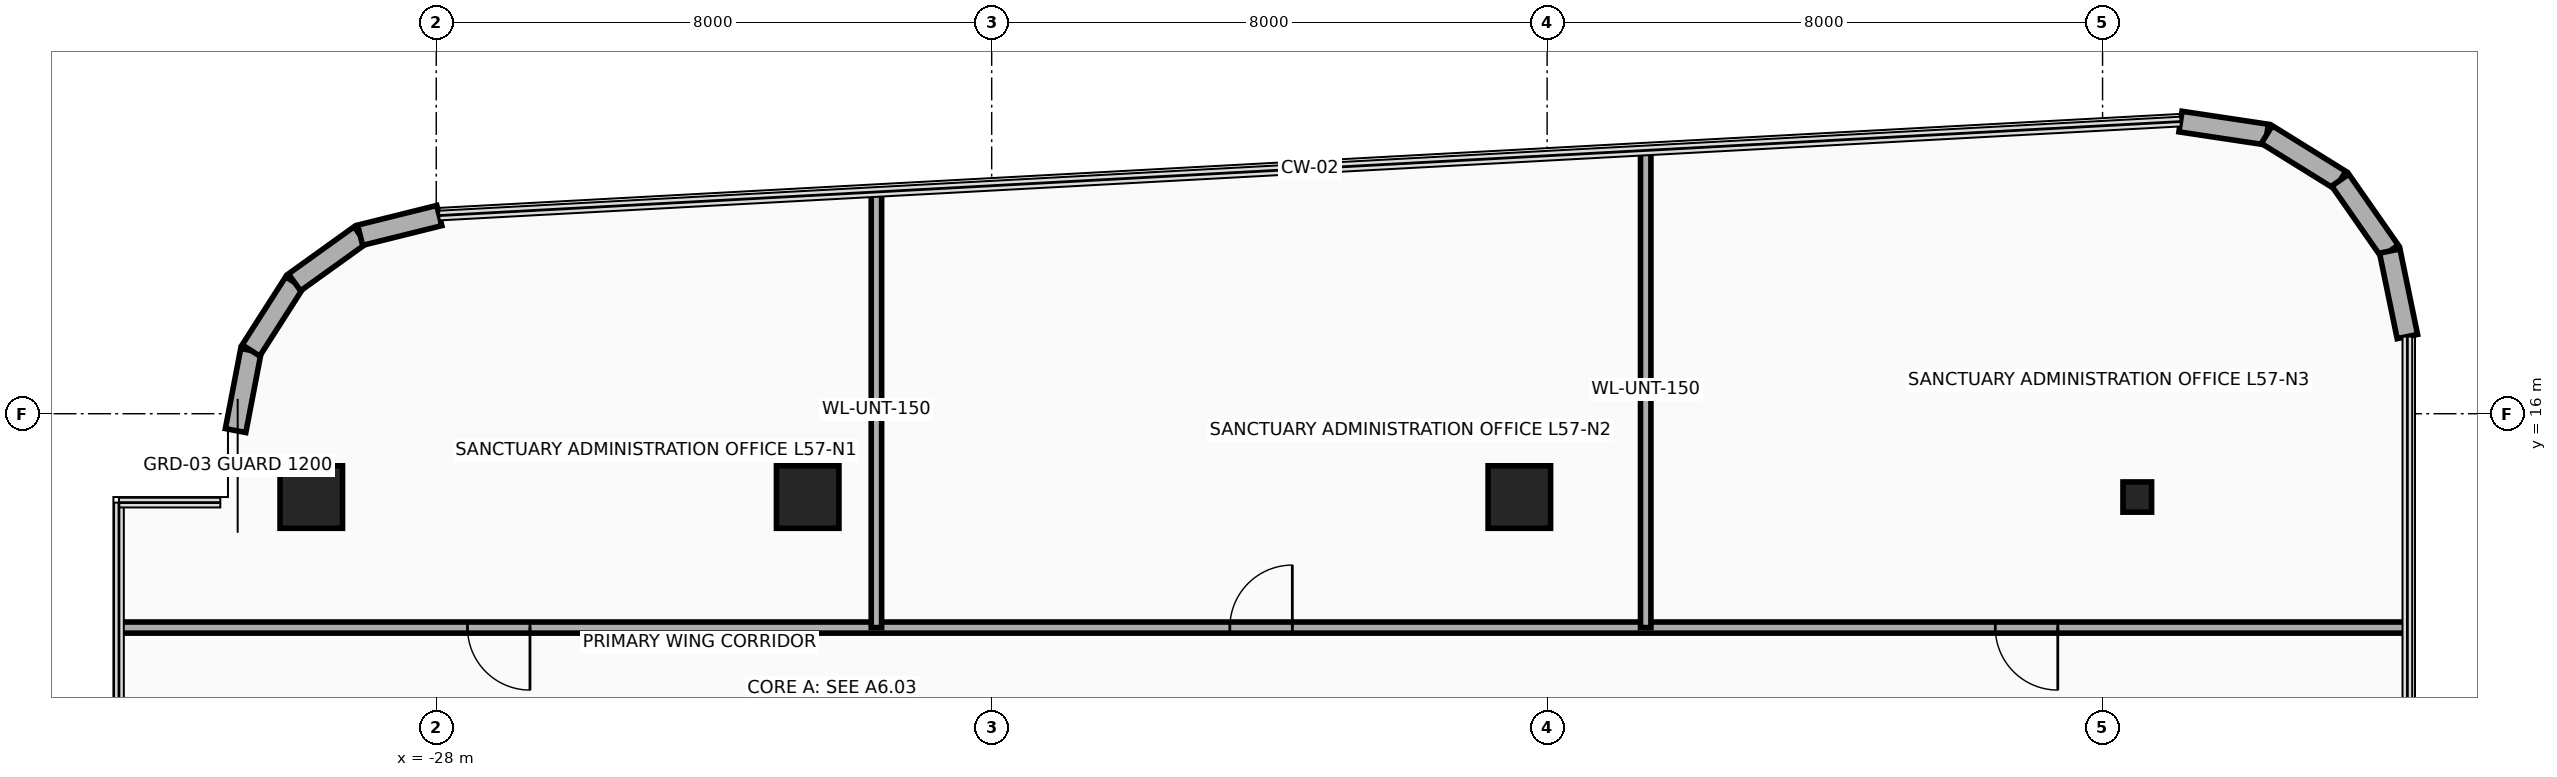
"""IFC4 building model, lengths in metres.
Left out: names, types, materials, properties, quantities, classifications, styles, units other than length and angle.
Written with IfcOpenShell. Run it as: python <this file> out.ifc"""

import sys

from ifc_helpers import new_model, si_unit, direction, frame, frame_2d, origin, origin_2d, place, context, subcontext, project, spatial, rectangle, i_section, extrude, source, transform, mapped, element, fill, save


model = new_model("IFC4")
c1 = context("Model", 3, precision=1e-05, world=origin(), true_north=direction((0.0, 1.0)))
c2 = subcontext(c1, "Body", "Model", "MODEL_VIEW")
j1 = project(units=[si_unit("LENGTHUNIT", "METRE"), si_unit("PLANEANGLEUNIT", "RADIAN")], contexts=[c1])
p1 = place(None, origin())
s1 = spatial("IfcSite", under=j1, at=p1, CompositionType="ELEMENT")
p2 = place(p1, origin())
s2 = spatial("IfcBuilding", under=s1, at=p2, CompositionType="ELEMENT")
p3 = place(p2, frame((0.0, 0.0, 223.0)))
s3 = spatial("IfcBuildingStorey", under=s2, at=p3, CompositionType="ELEMENT", Elevation=223.0)
m1 = source(origin(), c2, "Body", "SweptSolid", [
    extrude(rectangle(XDim=0.9, YDim=0.9, at=origin_2d()), origin(), (0.0, 0.0, 1.0), 3.5),
])
for number, where, z_axis, x_axis in (
    (1, (-29.8, 14.8, 0.0), (0.0, 0.0, 1.0), (1.0, 0.0, 0.0)),
    (2, (-22.65, 14.8, 0.0), (0.0, 0.0, 1.0), (1.0, 0.0, 0.0)),
    (3, (-12.4, 14.8, 0.0), (0.0, 0.0, 1.0), (1.0, 0.0, 0.0)),
):
    element("IfcColumn", number, at=place(p3, frame(where, z_axis=z_axis, x_axis=x_axis)), inside=s3, PredefinedType="COLUMN", context=c2, shape_type="MappedRepresentation", body=[
        mapped(m1, transform((0.0, 0.0, 0.0), x_axis=(1.0, 0.0, 0.0), y_axis=(0.0, 1.0, 0.0), z_axis=(0.0, 0.0, 1.0), scale=1.0)),
    ])
m2 = source(origin(), c2, "Body", "SweptSolid", [
    extrude(i_section(OverallWidth=0.412, OverallDepth=0.435, WebThickness=0.036, FlangeThickness=0.057, at=origin_2d()), origin(), (0.0, 0.0, 1.0), 3.5),
])
p4 = place(p3, frame((-3.5, 14.8, 0.0), z_axis=(0.0, 0.0, 1.0), x_axis=(1.0, 0.0, 0.0)))
e4 = element("IfcColumn", 4, at=p4, inside=s3, PredefinedType="COLUMN", context=c2, shape_type="MappedRepresentation", body=[
    mapped(m2, transform((0.0, 0.0, 0.0), x_axis=(1.0, 0.0, 0.0), y_axis=(0.0, 1.0, 0.0), z_axis=(0.0, 0.0, 1.0), scale=1.0)),
])
p5 = place(p3, frame((-30.89, 15.758, 0.0), z_axis=(0.0, 0.0, 1.0), x_axis=(0.18831542659, 0.982108598938, 0.0)))
e5 = element("IfcWall", 5, at=p5, inside=s3, PredefinedType="SOLIDWALL", context=c2, shape_type="SweptSolid", body=[
    extrude(rectangle(XDim=1.175, YDim=0.3, at=frame_2d((0.587, 0.0))), origin(), (0.0, 0.0, 1.0), 3.26),
])
p6 = place(p3, frame((-30.669, 16.911, 0.0), z_axis=(0.0, 0.0, 1.0), x_axis=(0.538678781902, 0.84251122837, 0.0)))
e6 = element("IfcWall", 6, at=p6, inside=s3, PredefinedType="SOLIDWALL", context=c2, shape_type="SweptSolid", body=[
    extrude(rectangle(XDim=1.164, YDim=0.3, at=frame_2d((0.582, 0.0))), origin(), (0.0, 0.0, 1.0), 3.26),
])
p7 = place(p3, frame((-30.042, 17.892, 0.0), z_axis=(0.0, 0.0, 1.0), x_axis=(0.812313539683, 0.583220981487, 0.0)))
e7 = element("IfcWall", 7, at=p7, inside=s3, PredefinedType="SOLIDWALL", context=c2, shape_type="SweptSolid", body=[
    extrude(rectangle(XDim=1.164, YDim=0.3, at=frame_2d((0.582, 0.0))), origin(), (0.0, 0.0, 1.0), 3.26),
])
p8 = place(p3, frame((-29.096, 18.571, 0.0), z_axis=(0.0, 0.0, 1.0), x_axis=(0.97050812798, 0.241068400098, 0.0)))
e8 = element("IfcWall", 8, at=p8, inside=s3, PredefinedType="SOLIDWALL", context=c2, shape_type="SweptSolid", body=[
    extrude(rectangle(XDim=1.175, YDim=0.3, at=frame_2d((0.587, 0.0))), origin(), (0.0, 0.0, 1.0), 3.26),
])
p9 = place(p3, frame((-2.878, 20.208, 0.0), z_axis=(0.0, 0.0, 1.0), x_axis=(0.988902138571, -0.148568369208, 0.0)))
e9 = element("IfcWall", 9, at=p9, inside=s3, PredefinedType="SOLIDWALL", context=c2, shape_type="SweptSolid", body=[
    extrude(rectangle(XDim=1.257, YDim=0.3, at=frame_2d((0.628, 0.0))), origin(), (0.0, 0.0, 1.0), 3.26),
])
p10 = place(p3, frame((-1.635, 20.021, 0.0), z_axis=(0.0, 0.0, 1.0), x_axis=(0.849646224094, -0.52735310171, 0.0)))
e10 = element("IfcWall", 10, at=p10, inside=s3, PredefinedType="SOLIDWALL", context=c2, shape_type="SweptSolid", body=[
    extrude(rectangle(XDim=1.245, YDim=0.3, at=frame_2d((0.623, 0.0))), origin(), (0.0, 0.0, 1.0), 3.26),
])
p11 = place(p3, frame((-0.576, 19.364, 0.0), z_axis=(0.0, 0.0, 1.0), x_axis=(0.572304219931, -0.820041389107, 0.0)))
e11 = element("IfcWall", 11, at=p11, inside=s3, PredefinedType="SOLIDWALL", context=c2, shape_type="SweptSolid", body=[
    extrude(rectangle(XDim=1.246, YDim=0.3, at=frame_2d((0.623, 0.0))), origin(), (0.0, 0.0, 1.0), 3.26),
])
p12 = place(p3, frame((0.136, 18.343, 0.0), z_axis=(0.0, 0.0, 1.0), x_axis=(0.201603599025, -0.979467196419, 0.0)))
e12 = element("IfcWall", 12, at=p12, inside=s3, PredefinedType="SOLIDWALL", context=c2, shape_type="SweptSolid", body=[
    extrude(rectangle(XDim=1.257, YDim=0.3, at=frame_2d((0.628, 0.0))), origin(), (0.0, 0.0, 1.0), 3.26),
])
p13 = place(p3, frame((-32.54, 12.92, 0.0), z_axis=(0.0, 0.0, 1.0), x_axis=(1.0, 0.0, 0.0)))
e13 = element("IfcWall", 13, at=p13, inside=s3, PredefinedType="PARTITIONING", context=c2, shape_type="SweptSolid", body=[
    extrude(rectangle(XDim=32.93, YDim=0.16, at=frame_2d((16.465, 0.0))), origin(), (0.0, 0.0, 1.0), 2.634),
])
p14 = place(p13, frame((4.99, 0.0, 0.0)))
e14 = element("IfcOpeningElement", 14, at=p14, cuts=e13, PredefinedType="OPENING", context=c2, shape_type="SweptSolid", body=[
    extrude(rectangle(XDim=0.9, YDim=2.1, at=frame_2d((0.45, 1.05))), frame((0.0, 0.095, 0.0), z_axis=(0.0, -1.0, 0.0), x_axis=(1.0, 0.0, 0.0)), (0.0, 0.0, 1.0), 0.19),
])
p15 = place(p13, frame((15.97, 0.0, 0.0)))
e15 = element("IfcOpeningElement", 15, at=p15, cuts=e13, PredefinedType="OPENING", context=c2, shape_type="SweptSolid", body=[
    extrude(rectangle(XDim=0.9, YDim=2.1, at=frame_2d((0.45, 1.05))), frame((0.0, 0.095, 0.0), z_axis=(0.0, -1.0, 0.0), x_axis=(1.0, 0.0, 0.0)), (0.0, 0.0, 1.0), 0.19),
])
p16 = place(p13, frame((26.995, 0.0, 0.0)))
e16 = element("IfcOpeningElement", 16, at=p16, cuts=e13, PredefinedType="OPENING", context=c2, shape_type="SweptSolid", body=[
    extrude(rectangle(XDim=0.9, YDim=2.1, at=frame_2d((0.45, 1.05))), frame((0.0, 0.095, 0.0), z_axis=(0.0, -1.0, 0.0), x_axis=(1.0, 0.0, 0.0)), (0.0, 0.0, 1.0), 0.19),
])
p17 = place(p3, frame((-21.66, 12.92, 0.0), z_axis=(0.0, 0.0, 1.0), x_axis=(0.0, 1.0, 0.0)))
e17 = element("IfcWall", 17, at=p17, inside=s3, PredefinedType="PARTITIONING", context=c2, shape_type="SweptSolid", body=[
    extrude(rectangle(XDim=6.274, YDim=0.15, at=frame_2d((3.137, 0.0))), origin(), (0.0, 0.0, 1.0), 2.544),
])
p18 = place(p3, frame((-10.58, 12.92, 0.0), z_axis=(0.0, 0.0, 1.0), x_axis=(0.0, 1.0, 0.0)))
e18 = element("IfcWall", 18, at=p18, inside=s3, PredefinedType="PARTITIONING", context=c2, shape_type="SweptSolid", body=[
    extrude(rectangle(XDim=6.872, YDim=0.15, at=frame_2d((3.436, 0.0))), origin(), (0.0, 0.0, 1.0), 2.544),
])
p19 = place(p14, frame((0.9, 0.0, 0.0), z_axis=(0.0, 0.0, 1.0), x_axis=(-1.0, 0.0, 0.0)))
e19 = element("IfcDoor", 19, at=p19, inside=s3, OperationType="SINGLE_SWING_LEFT", PredefinedType="DOOR", context=c2, shape_type="SweptSolid", body=[
    extrude(rectangle(XDim=0.9, YDim=2.1, at=frame_2d((0.45, 1.05))), frame((0.0, 0.025, 0.0), z_axis=(0.0, -1.0, 0.0), x_axis=(1.0, 0.0, 0.0)), (0.0, 0.0, 1.0), 0.05),
])
fill(e14, e19)
p20 = place(p15, origin())
e20 = element("IfcDoor", 20, at=p20, inside=s3, OperationType="SINGLE_SWING_RIGHT", PredefinedType="DOOR", context=c2, shape_type="SweptSolid", body=[
    extrude(rectangle(XDim=0.9, YDim=2.1, at=frame_2d((0.45, 1.05))), frame((0.0, 0.025, 0.0), z_axis=(0.0, -1.0, 0.0), x_axis=(1.0, 0.0, 0.0)), (0.0, 0.0, 1.0), 0.05),
])
fill(e15, e20)
p21 = place(p16, frame((0.9, 0.0, 0.0), z_axis=(0.0, 0.0, 1.0), x_axis=(-1.0, 0.0, 0.0)))
e21 = element("IfcDoor", 21, at=p21, inside=s3, OperationType="SINGLE_SWING_LEFT", PredefinedType="DOOR", context=c2, shape_type="SweptSolid", body=[
    extrude(rectangle(XDim=0.9, YDim=2.1, at=frame_2d((0.45, 1.05))), frame((0.0, 0.025, 0.0), z_axis=(0.0, -1.0, 0.0), x_axis=(1.0, 0.0, 0.0)), (0.0, 0.0, 1.0), 0.05),
])
fill(e16, e21)
save(model, sys.argv[1])
